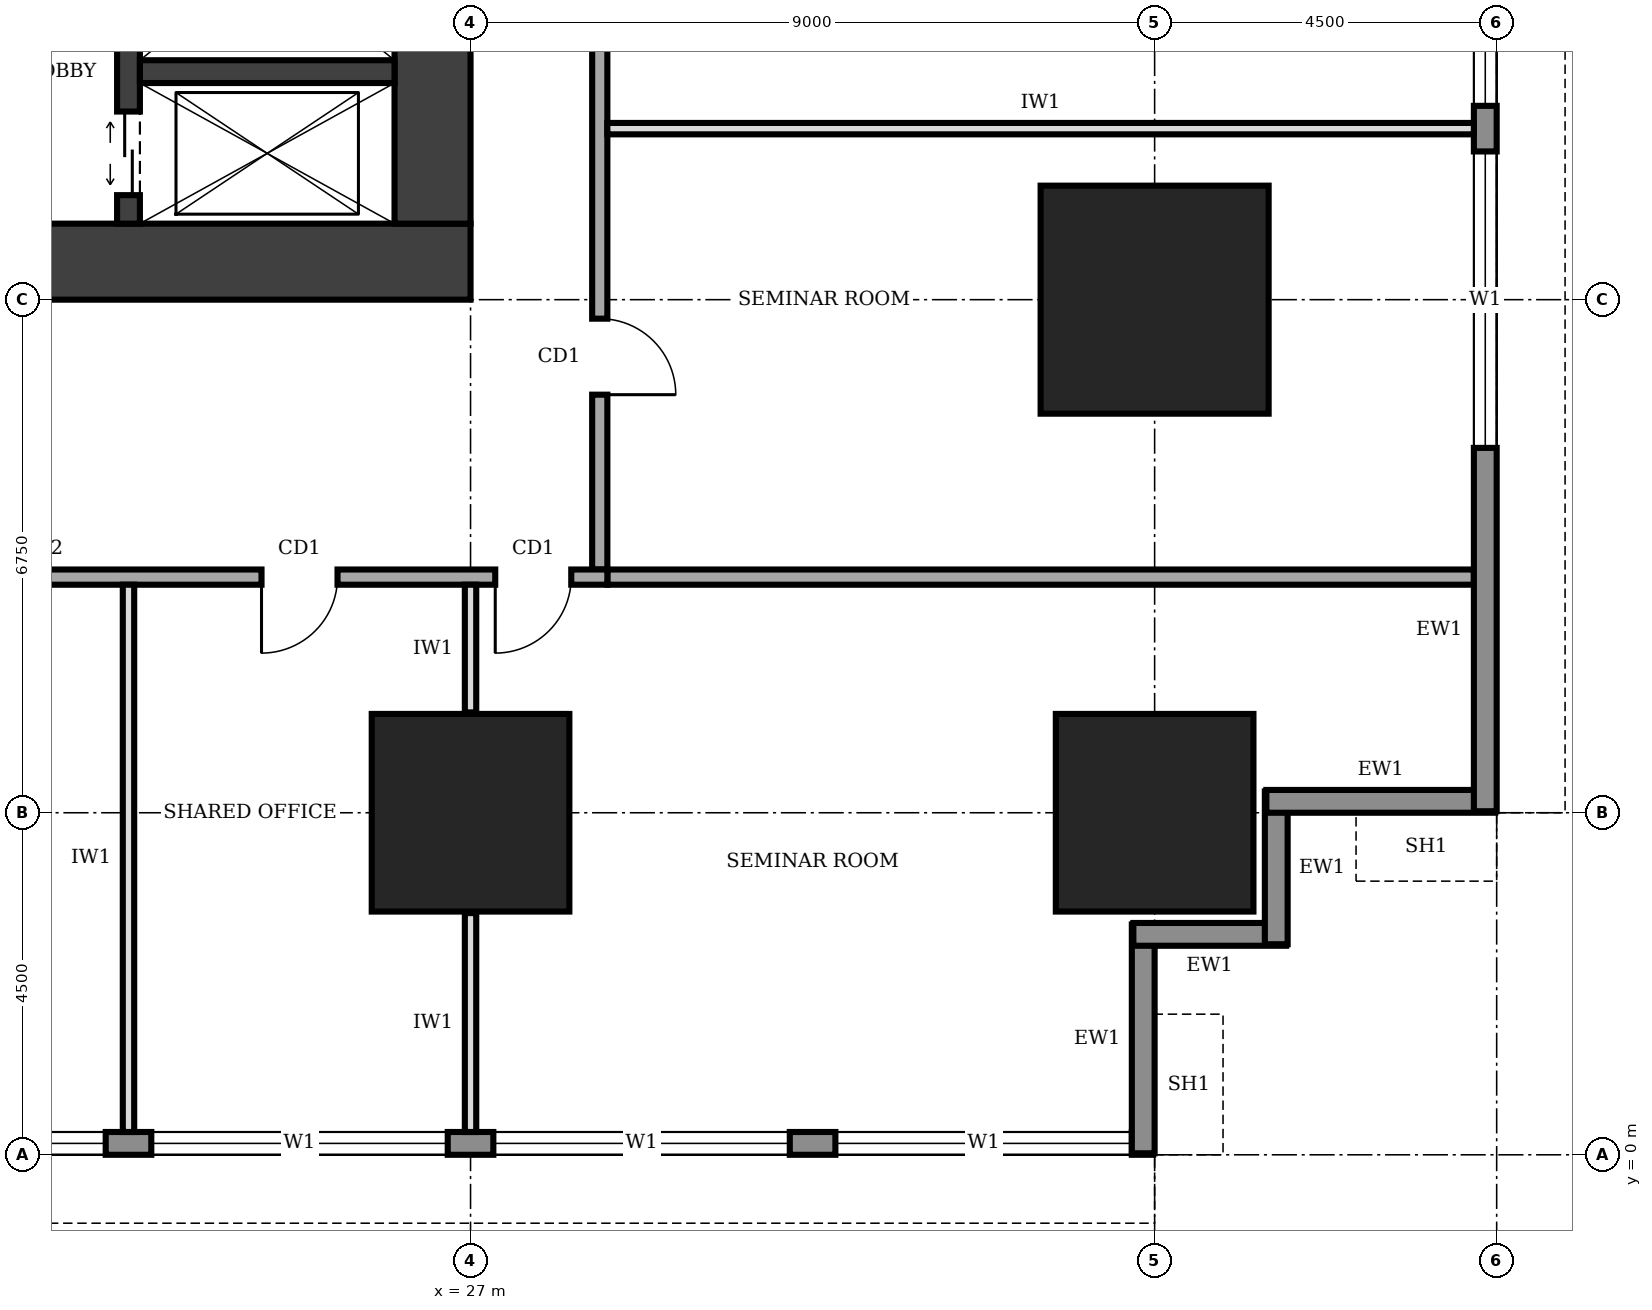
"""IFC4 building model, lengths in metres.
Left out: names, types, materials, properties, quantities, classifications, styles, units other than length and angle.
Written with IfcOpenShell. Run it as: python <this file> out.ifc"""

import sys

from ifc_helpers import new_model, si_unit, direction, frame, frame_2d, origin, origin_2d, place, context, subcontext, project, spatial, rectangle, extrude, element, fill, save


model = new_model("IFC4")
c1 = context("Model", 3, precision=1e-05, world=origin(), true_north=direction((0.0, 1.0)))
c2 = subcontext(c1, "Body", "Model", "MODEL_VIEW")
j1 = project(units=[si_unit("LENGTHUNIT", "METRE"), si_unit("PLANEANGLEUNIT", "RADIAN")], contexts=[c1])
p1 = place(None, origin())
s1 = spatial("IfcSite", under=j1, at=p1, CompositionType="ELEMENT")
p2 = place(p1, origin())
s2 = spatial("IfcBuilding", under=s1, at=p2, CompositionType="ELEMENT")
p3 = place(p2, frame((0.0, 0.0, 33.0)))
s3 = spatial("IfcBuildingStorey", under=s2, at=p3, CompositionType="ELEMENT", Elevation=33.0)
p4 = place(p3, frame((13.5, 11.75, 0.0), z_axis=(0.0, 0.0, 1.0), x_axis=(1.0, 0.0, 0.0)))
e1 = element("IfcWall", 1, at=p4, inside=s3, PredefinedType="SHEAR", context=c2, shape_type="SweptSolid", body=[
    extrude(rectangle(XDim=13.5, YDim=1.0, at=frame_2d((6.75, 0.0))), origin(), (0.0, 0.0, 1.0), 4.0),
])
p5 = place(p4, frame((4.75, 0.0, 0.0)))
e2 = element("IfcOpeningElement", 2, at=p5, cuts=e1, PredefinedType="OPENING", context=c2, shape_type="SweptSolid", body=[
    extrude(rectangle(XDim=1.0, YDim=2.1, at=frame_2d((0.5, 1.05))), frame((0.0, 0.51, 0.0), z_axis=(0.0, -1.0, 0.0), x_axis=(1.0, 0.0, 0.0)), (0.0, 0.0, 1.0), 1.02),
])
p6 = place(p3, frame((26.5, 12.25, 0.0), z_axis=(0.0, 0.0, 1.0), x_axis=(0.0, 1.0, 0.0)))
e3 = element("IfcWall", 3, at=p6, inside=s3, PredefinedType="SHEAR", context=c2, shape_type="SweptSolid", body=[
    extrude(rectangle(XDim=16.0, YDim=1.0, at=frame_2d((8.0, 0.0))), origin(), (0.0, 0.0, 1.0), 4.0),
])
p7 = place(p3, frame((22.5, 12.25, 0.0), z_axis=(0.0, 0.0, 1.0), x_axis=(0.0, 1.0, 0.0)))
e4 = element("IfcWall", 4, at=p7, inside=s3, PredefinedType="SHEAR", context=c2, shape_type="SweptSolid", body=[
    extrude(rectangle(XDim=16.0, YDim=0.3, at=frame_2d((8.0, 0.0))), origin(), (0.0, 0.0, 1.0), 4.0),
])
p8 = place(p7, frame((14.6, 0.0, 0.0)))
e5 = element("IfcOpeningElement", 5, at=p8, cuts=e4, PredefinedType="OPENING", context=c2, shape_type="SweptSolid", body=[
    extrude(rectangle(XDim=1.0, YDim=2.1, at=frame_2d((0.5, 1.05))), frame((0.0, 0.16, 0.0), z_axis=(0.0, -1.0, 0.0), x_axis=(1.0, 0.0, 0.0)), (0.0, 0.0, 1.0), 0.32),
])
p9 = place(p7, frame((0.375, 0.0, 0.0)))
e6 = element("IfcOpeningElement", 6, at=p9, cuts=e4, PredefinedType="OPENING", context=c2, shape_type="SweptSolid", body=[
    extrude(rectangle(XDim=1.1, YDim=2.1, at=frame_2d((0.55, 1.05))), frame((0.0, 0.16, 0.0), z_axis=(0.0, -1.0, 0.0), x_axis=(1.0, 0.0, 0.0)), (0.0, 0.0, 1.0), 0.32),
])
p10 = place(p7, frame((5.95, 0.0, 0.0)))
e7 = element("IfcOpeningElement", 7, at=p10, cuts=e4, PredefinedType="OPENING", context=c2, shape_type="SweptSolid", body=[
    extrude(rectangle(XDim=1.1, YDim=2.1, at=frame_2d((0.55, 1.05))), frame((0.0, 0.16, 0.0), z_axis=(0.0, -1.0, 0.0), x_axis=(1.0, 0.0, 0.0)), (0.0, 0.0, 1.0), 0.32),
])
p11 = place(p3, frame((22.65, 14.25, 0.0), z_axis=(0.0, 0.0, 1.0), x_axis=(1.0, 0.0, 0.0)))
e8 = element("IfcWall", 8, at=p11, inside=s3, PredefinedType="SHEAR", context=c2, shape_type="SweptSolid", body=[
    extrude(rectangle(XDim=3.35, YDim=0.3, at=frame_2d((1.675, 0.0))), origin(), (0.0, 0.0, 1.0), 4.0),
])
for number, where, z_axis, x_axis in (
    (9, (27.0, 4.5, 0.0), (0.0, 0.0, 1.0), (1.0, 0.0, 0.0)),
    (10, (36.0, 4.5, 0.0), (0.0, 0.0, 1.0), (1.0, 0.0, 0.0)),
):
    element("IfcColumn", number, at=place(p3, frame(where, z_axis=z_axis, x_axis=x_axis)), inside=s3, PredefinedType="COLUMN", context=c2, shape_type="SweptSolid", body=[
        extrude(rectangle(XDim=2.6, YDim=2.6, at=origin_2d()), origin(), (0.0, 0.0, 1.0), 4.0),
    ])
p12 = place(p3, frame((36.0, 11.25, 0.0), z_axis=(0.0, 0.0, 1.0), x_axis=(1.0, 0.0, 0.0)))
e11 = element("IfcColumn", 11, at=p12, inside=s3, PredefinedType="COLUMN", context=c2, shape_type="SweptSolid", body=[
    extrude(rectangle(XDim=3.0, YDim=3.0, at=origin_2d()), origin(), (0.0, 0.0, 1.0), 4.0),
])
p13 = place(p3, frame((4.52, 0.15, 0.0), z_axis=(0.0, 0.0, 1.0), x_axis=(1.0, 0.0, 0.0)))
e12 = element("IfcWall", 12, at=p13, inside=s3, PredefinedType="STANDARD", context=c2, shape_type="SweptSolid", body=[
    extrude(rectangle(XDim=31.46, YDim=0.3, at=frame_2d((15.73, 0.0))), origin(), (0.0, 0.0, 1.0), 3.75),
])
p14 = place(p13, frame((4.78, 0.0, 0.9)))
e13 = element("IfcOpeningElement", 13, at=p14, cuts=e12, PredefinedType="OPENING", context=c2, shape_type="SweptSolid", body=[
    extrude(rectangle(XDim=3.9, YDim=2.2, at=frame_2d((1.95, 1.1))), frame((0.0, 0.16, 0.0), z_axis=(0.0, -1.0, 0.0), x_axis=(1.0, 0.0, 0.0)), (0.0, 0.0, 1.0), 0.32),
])
p15 = place(p13, frame((9.28, 0.0, 0.9)))
e14 = element("IfcOpeningElement", 14, at=p15, cuts=e12, PredefinedType="OPENING", context=c2, shape_type="SweptSolid", body=[
    extrude(rectangle(XDim=3.9, YDim=2.2, at=frame_2d((1.95, 1.1))), frame((0.0, 0.16, 0.0), z_axis=(0.0, -1.0, 0.0), x_axis=(1.0, 0.0, 0.0)), (0.0, 0.0, 1.0), 0.32),
])
p16 = place(p13, frame((13.78, 0.0, 0.9)))
e15 = element("IfcOpeningElement", 15, at=p16, cuts=e12, PredefinedType="OPENING", context=c2, shape_type="SweptSolid", body=[
    extrude(rectangle(XDim=3.9, YDim=2.2, at=frame_2d((1.95, 1.1))), frame((0.0, 0.16, 0.0), z_axis=(0.0, -1.0, 0.0), x_axis=(1.0, 0.0, 0.0)), (0.0, 0.0, 1.0), 0.32),
])
p17 = place(p13, frame((18.28, 0.0, 0.9)))
e16 = element("IfcOpeningElement", 16, at=p17, cuts=e12, PredefinedType="OPENING", context=c2, shape_type="SweptSolid", body=[
    extrude(rectangle(XDim=3.9, YDim=2.2, at=frame_2d((1.95, 1.1))), frame((0.0, 0.16, 0.0), z_axis=(0.0, -1.0, 0.0), x_axis=(1.0, 0.0, 0.0)), (0.0, 0.0, 1.0), 0.32),
])
p18 = place(p13, frame((22.78, 0.0, 0.9)))
e17 = element("IfcOpeningElement", 17, at=p18, cuts=e12, PredefinedType="OPENING", context=c2, shape_type="SweptSolid", body=[
    extrude(rectangle(XDim=3.9, YDim=2.2, at=frame_2d((1.95, 1.1))), frame((0.0, 0.16, 0.0), z_axis=(0.0, -1.0, 0.0), x_axis=(1.0, 0.0, 0.0)), (0.0, 0.0, 1.0), 0.32),
])
p19 = place(p13, frame((27.28, 0.0, 0.9)))
e18 = element("IfcOpeningElement", 18, at=p19, cuts=e12, PredefinedType="OPENING", context=c2, shape_type="SweptSolid", body=[
    extrude(rectangle(XDim=3.9, YDim=2.2, at=frame_2d((1.95, 1.1))), frame((0.0, 0.16, 0.0), z_axis=(0.0, -1.0, 0.0), x_axis=(1.0, 0.0, 0.0)), (0.0, 0.0, 1.0), 0.32),
])
p20 = place(p3, frame((35.85, 0.02, 0.0), z_axis=(0.0, 0.0, 1.0), x_axis=(0.0, 1.0, 0.0)))
e19 = element("IfcWall", 19, at=p20, inside=s3, PredefinedType="STANDARD", context=c2, shape_type="SweptSolid", body=[
    extrude(rectangle(XDim=3.01, YDim=0.3, at=frame_2d((1.505, 0.0))), origin(), (0.0, 0.0, 1.0), 2.85),
])
for number, where, z_axis, x_axis in (
    (20, (35.72, 2.9, 0.0), (0.0, 0.0, 1.0), (1.0, 0.0, 0.0)),
    (21, (37.6, 2.77, 0.0), (0.0, 0.0, 1.0), (0.0, 1.0, 0.0)),
):
    element("IfcWall", number, at=place(p3, frame(where, z_axis=z_axis, x_axis=x_axis)), inside=s3, PredefinedType="STANDARD", context=c2, shape_type="SweptSolid", body=[
        extrude(rectangle(XDim=2.01, YDim=0.3, at=frame_2d((1.005, 0.0))), origin(), (0.0, 0.0, 1.0), 3.75),
    ])
p21 = place(p3, frame((37.47, 4.65, 0.0), z_axis=(0.0, 0.0, 1.0), x_axis=(1.0, 0.0, 0.0)))
e22 = element("IfcWall", 22, at=p21, inside=s3, PredefinedType="STANDARD", context=c2, shape_type="SweptSolid", body=[
    extrude(rectangle(XDim=3.01, YDim=0.3, at=frame_2d((1.505, 0.0))), origin(), (0.0, 0.0, 1.0), 2.85),
])
p22 = place(p3, frame((40.35, 4.52, 0.0), z_axis=(0.0, 0.0, 1.0), x_axis=(0.0, 1.0, 0.0)))
e23 = element("IfcWall", 23, at=p22, inside=s3, PredefinedType="STANDARD", context=c2, shape_type="SweptSolid", body=[
    extrude(rectangle(XDim=31.46, YDim=0.3, at=frame_2d((15.73, 0.0))), origin(), (0.0, 0.0, 1.0), 3.75),
])
p23 = place(p22, frame((4.78, 0.0, 0.9)))
e24 = element("IfcOpeningElement", 24, at=p23, cuts=e23, PredefinedType="OPENING", context=c2, shape_type="SweptSolid", body=[
    extrude(rectangle(XDim=3.9, YDim=2.2, at=frame_2d((1.95, 1.1))), frame((0.0, 0.16, 0.0), z_axis=(0.0, -1.0, 0.0), x_axis=(1.0, 0.0, 0.0)), (0.0, 0.0, 1.0), 0.32),
])
p24 = place(p22, frame((9.28, 0.0, 0.9)))
e25 = element("IfcOpeningElement", 25, at=p24, cuts=e23, PredefinedType="OPENING", context=c2, shape_type="SweptSolid", body=[
    extrude(rectangle(XDim=3.9, YDim=2.2, at=frame_2d((1.95, 1.1))), frame((0.0, 0.16, 0.0), z_axis=(0.0, -1.0, 0.0), x_axis=(1.0, 0.0, 0.0)), (0.0, 0.0, 1.0), 0.32),
])
p25 = place(p22, frame((13.78, 0.0, 0.9)))
e26 = element("IfcOpeningElement", 26, at=p25, cuts=e23, PredefinedType="OPENING", context=c2, shape_type="SweptSolid", body=[
    extrude(rectangle(XDim=3.9, YDim=2.2, at=frame_2d((1.95, 1.1))), frame((0.0, 0.16, 0.0), z_axis=(0.0, -1.0, 0.0), x_axis=(1.0, 0.0, 0.0)), (0.0, 0.0, 1.0), 0.32),
])
p26 = place(p22, frame((18.28, 0.0, 0.9)))
e27 = element("IfcOpeningElement", 27, at=p26, cuts=e23, PredefinedType="OPENING", context=c2, shape_type="SweptSolid", body=[
    extrude(rectangle(XDim=3.9, YDim=2.2, at=frame_2d((1.95, 1.1))), frame((0.0, 0.16, 0.0), z_axis=(0.0, -1.0, 0.0), x_axis=(1.0, 0.0, 0.0)), (0.0, 0.0, 1.0), 0.32),
])
p27 = place(p22, frame((22.78, 0.0, 0.9)))
e28 = element("IfcOpeningElement", 28, at=p27, cuts=e23, PredefinedType="OPENING", context=c2, shape_type="SweptSolid", body=[
    extrude(rectangle(XDim=3.9, YDim=2.2, at=frame_2d((1.95, 1.1))), frame((0.0, 0.16, 0.0), z_axis=(0.0, -1.0, 0.0), x_axis=(1.0, 0.0, 0.0)), (0.0, 0.0, 1.0), 0.32),
])
p28 = place(p22, frame((27.28, 0.0, 0.9)))
e29 = element("IfcOpeningElement", 29, at=p28, cuts=e23, PredefinedType="OPENING", context=c2, shape_type="SweptSolid", body=[
    extrude(rectangle(XDim=3.9, YDim=2.2, at=frame_2d((1.95, 1.1))), frame((0.0, 0.16, 0.0), z_axis=(0.0, -1.0, 0.0), x_axis=(1.0, 0.0, 0.0)), (0.0, 0.0, 1.0), 0.32),
])
p29 = place(p3, frame((11.9, 7.6, 0.0), z_axis=(0.0, 0.0, 1.0), x_axis=(1.0, 0.0, 0.0)))
e30 = element("IfcWall", 30, at=p29, inside=s3, PredefinedType="SOLIDWALL", context=c2, shape_type="SweptSolid", body=[
    extrude(rectangle(XDim=16.9, YDim=0.2, at=frame_2d((8.45, 0.0))), origin(), (0.0, 0.0, 1.0), 3.75),
])
p30 = place(p29, frame((0.275, 0.0, 0.0)))
e31 = element("IfcOpeningElement", 31, at=p30, cuts=e30, PredefinedType="OPENING", context=c2, shape_type="SweptSolid", body=[
    extrude(rectangle(XDim=1.0, YDim=2.1, at=frame_2d((0.5, 1.05))), frame((0.0, 0.11, 0.0), z_axis=(0.0, -1.0, 0.0), x_axis=(1.0, 0.0, 0.0)), (0.0, 0.0, 1.0), 0.22),
])
p31 = place(p29, frame((5.6, 0.0, 0.0)))
e32 = element("IfcOpeningElement", 32, at=p31, cuts=e30, PredefinedType="OPENING", context=c2, shape_type="SweptSolid", body=[
    extrude(rectangle(XDim=1.0, YDim=2.1, at=frame_2d((0.5, 1.05))), frame((0.0, 0.11, 0.0), z_axis=(0.0, -1.0, 0.0), x_axis=(1.0, 0.0, 0.0)), (0.0, 0.0, 1.0), 0.22),
])
p32 = place(p29, frame((12.35, 0.0, 0.0)))
e33 = element("IfcOpeningElement", 33, at=p32, cuts=e30, PredefinedType="OPENING", context=c2, shape_type="SweptSolid", body=[
    extrude(rectangle(XDim=1.0, YDim=2.1, at=frame_2d((0.5, 1.05))), frame((0.0, 0.11, 0.0), z_axis=(0.0, -1.0, 0.0), x_axis=(1.0, 0.0, 0.0)), (0.0, 0.0, 1.0), 0.22),
])
p33 = place(p29, frame((15.425, 0.0, 0.0)))
e34 = element("IfcOpeningElement", 34, at=p33, cuts=e30, PredefinedType="OPENING", context=c2, shape_type="SweptSolid", body=[
    extrude(rectangle(XDim=1.0, YDim=2.1, at=frame_2d((0.5, 1.05))), frame((0.0, 0.11, 0.0), z_axis=(0.0, -1.0, 0.0), x_axis=(1.0, 0.0, 0.0)), (0.0, 0.0, 1.0), 0.22),
])
p34 = place(p3, frame((28.7, 7.7, 0.0), z_axis=(0.0, 0.0, 1.0), x_axis=(0.0, 1.0, 0.0)))
e35 = element("IfcWall", 35, at=p34, inside=s3, PredefinedType="SOLIDWALL", context=c2, shape_type="SweptSolid", body=[
    extrude(rectangle(XDim=23.8, YDim=0.2, at=frame_2d((11.9, 0.0))), origin(), (0.0, 0.0, 1.0), 3.75),
])
p35 = place(p34, frame((2.3, 0.0, 0.0)))
e36 = element("IfcOpeningElement", 36, at=p35, cuts=e35, PredefinedType="OPENING", context=c2, shape_type="SweptSolid", body=[
    extrude(rectangle(XDim=1.0, YDim=2.1, at=frame_2d((0.5, 1.05))), frame((0.0, 0.11, 0.0), z_axis=(0.0, -1.0, 0.0), x_axis=(1.0, 0.0, 0.0)), (0.0, 0.0, 1.0), 0.22),
])
p36 = place(p34, frame((7.55, 0.0, 0.0)))
e37 = element("IfcOpeningElement", 37, at=p36, cuts=e35, PredefinedType="OPENING", context=c2, shape_type="SweptSolid", body=[
    extrude(rectangle(XDim=1.0, YDim=2.1, at=frame_2d((0.5, 1.05))), frame((0.0, 0.11, 0.0), z_axis=(0.0, -1.0, 0.0), x_axis=(1.0, 0.0, 0.0)), (0.0, 0.0, 1.0), 0.22),
])
p37 = place(p34, frame((12.05, 0.0, 0.0)))
e38 = element("IfcOpeningElement", 38, at=p37, cuts=e35, PredefinedType="OPENING", context=c2, shape_type="SweptSolid", body=[
    extrude(rectangle(XDim=1.0, YDim=2.1, at=frame_2d((0.5, 1.05))), frame((0.0, 0.11, 0.0), z_axis=(0.0, -1.0, 0.0), x_axis=(1.0, 0.0, 0.0)), (0.0, 0.0, 1.0), 0.22),
])
p38 = place(p34, frame((18.4, 0.0, 0.0)))
e39 = element("IfcOpeningElement", 39, at=p38, cuts=e35, PredefinedType="OPENING", context=c2, shape_type="SweptSolid", body=[
    extrude(rectangle(XDim=1.8, YDim=2.1, at=frame_2d((0.9, 1.05))), frame((0.0, 0.11, 0.0), z_axis=(0.0, -1.0, 0.0), x_axis=(1.0, 0.0, 0.0)), (0.0, 0.0, 1.0), 0.22),
])
p39 = place(p3, frame((28.8, 7.6, 0.0), z_axis=(0.0, 0.0, 1.0), x_axis=(1.0, 0.0, 0.0)))
e40 = element("IfcWall", 40, at=p39, inside=s3, PredefinedType="SOLIDWALL", context=c2, shape_type="SweptSolid", body=[
    extrude(rectangle(XDim=11.4, YDim=0.2, at=frame_2d((5.7, 0.0))), origin(), (0.0, 0.0, 1.0), 3.75),
])
p40 = place(p3, frame((22.5, 0.3, 0.0), z_axis=(0.0, 0.0, 1.0), x_axis=(0.0, 1.0, 0.0)))
e41 = element("IfcWall", 41, at=p40, inside=s3, PredefinedType="PARTITIONING", context=c2, shape_type="SweptSolid", body=[
    extrude(rectangle(XDim=7.2, YDim=0.15, at=frame_2d((3.6, 0.0))), origin(), (0.0, 0.0, 1.0), 3.75),
])
p41 = place(p3, frame((27.0, 0.3, 0.0), z_axis=(0.0, 0.0, 1.0), x_axis=(0.0, 1.0, 0.0)))
e42 = element("IfcWall", 42, at=p41, inside=s3, PredefinedType="PARTITIONING", context=c2, shape_type="SweptSolid", body=[
    extrude(rectangle(XDim=2.88, YDim=0.15, at=frame_2d((1.44, 0.0))), origin(), (0.0, 0.0, 1.0), 2.85),
])
p42 = place(p3, frame((27.0, 5.82, 0.0), z_axis=(0.0, 0.0, 1.0), x_axis=(0.0, 1.0, 0.0)))
e43 = element("IfcWall", 43, at=p42, inside=s3, PredefinedType="PARTITIONING", context=c2, shape_type="SweptSolid", body=[
    extrude(rectangle(XDim=1.68, YDim=0.15, at=frame_2d((0.84, 0.0))), origin(), (0.0, 0.0, 1.0), 2.85),
])
p43 = place(p3, frame((28.8, 13.5, 0.0), z_axis=(0.0, 0.0, 1.0), x_axis=(1.0, 0.0, 0.0)))
e44 = element("IfcWall", 44, at=p43, inside=s3, PredefinedType="PARTITIONING", context=c2, shape_type="SweptSolid", body=[
    extrude(rectangle(XDim=11.4, YDim=0.15, at=frame_2d((5.7, 0.0))), origin(), (0.0, 0.0, 1.0), 3.75),
])
p44 = place(p16, origin())
e45 = element("IfcWindow", 45, at=p44, inside=s3, PartitioningType="SINGLE_PANEL", PredefinedType="WINDOW", context=c2, shape_type="SweptSolid", body=[
    extrude(rectangle(XDim=3.9, YDim=2.2, at=frame_2d((1.95, 1.1))), frame((0.0, 0.03, 0.0), z_axis=(0.0, -1.0, 0.0), x_axis=(1.0, 0.0, 0.0)), (0.0, 0.0, 1.0), 0.06),
])
fill(e15, e45)
p45 = place(p17, origin())
e46 = element("IfcWindow", 46, at=p45, inside=s3, PartitioningType="SINGLE_PANEL", PredefinedType="WINDOW", context=c2, shape_type="SweptSolid", body=[
    extrude(rectangle(XDim=3.9, YDim=2.2, at=frame_2d((1.95, 1.1))), frame((0.0, 0.03, 0.0), z_axis=(0.0, -1.0, 0.0), x_axis=(1.0, 0.0, 0.0)), (0.0, 0.0, 1.0), 0.06),
])
fill(e16, e46)
p46 = place(p18, origin())
e47 = element("IfcWindow", 47, at=p46, inside=s3, PartitioningType="SINGLE_PANEL", PredefinedType="WINDOW", context=c2, shape_type="SweptSolid", body=[
    extrude(rectangle(XDim=3.9, YDim=2.2, at=frame_2d((1.95, 1.1))), frame((0.0, 0.03, 0.0), z_axis=(0.0, -1.0, 0.0), x_axis=(1.0, 0.0, 0.0)), (0.0, 0.0, 1.0), 0.06),
])
fill(e17, e47)
p47 = place(p19, origin())
e48 = element("IfcWindow", 48, at=p47, inside=s3, PartitioningType="SINGLE_PANEL", PredefinedType="WINDOW", context=c2, shape_type="SweptSolid", body=[
    extrude(rectangle(XDim=3.9, YDim=2.2, at=frame_2d((1.95, 1.1))), frame((0.0, 0.03, 0.0), z_axis=(0.0, -1.0, 0.0), x_axis=(1.0, 0.0, 0.0)), (0.0, 0.0, 1.0), 0.06),
])
fill(e18, e48)
p48 = place(p23, origin())
e49 = element("IfcWindow", 49, at=p48, inside=s3, PartitioningType="SINGLE_PANEL", PredefinedType="WINDOW", context=c2, shape_type="SweptSolid", body=[
    extrude(rectangle(XDim=3.9, YDim=2.2, at=frame_2d((1.95, 1.1))), frame((0.0, 0.03, 0.0), z_axis=(0.0, -1.0, 0.0), x_axis=(1.0, 0.0, 0.0)), (0.0, 0.0, 1.0), 0.06),
])
fill(e24, e49)
p49 = place(p24, origin())
e50 = element("IfcWindow", 50, at=p49, inside=s3, PartitioningType="SINGLE_PANEL", PredefinedType="WINDOW", context=c2, shape_type="SweptSolid", body=[
    extrude(rectangle(XDim=3.9, YDim=2.2, at=frame_2d((1.95, 1.1))), frame((0.0, 0.03, 0.0), z_axis=(0.0, -1.0, 0.0), x_axis=(1.0, 0.0, 0.0)), (0.0, 0.0, 1.0), 0.06),
])
fill(e25, e50)
p50 = place(p9, origin())
e51 = element("IfcDoor", 51, at=p50, inside=s3, OperationType="DOUBLE_DOOR_SLIDING", PredefinedType="DOOR", context=c2, shape_type="SweptSolid", body=[
    extrude(rectangle(XDim=1.1, YDim=2.1, at=frame_2d((0.55, 1.05))), frame((0.0, 0.025, 0.0), z_axis=(0.0, -1.0, 0.0), x_axis=(1.0, 0.0, 0.0)), (0.0, 0.0, 1.0), 0.05),
])
fill(e6, e51)
p51 = place(p32, frame((1.0, 0.0, 0.0), z_axis=(0.0, 0.0, 1.0), x_axis=(-1.0, 0.0, 0.0)))
e52 = element("IfcDoor", 52, at=p51, inside=s3, OperationType="SINGLE_SWING_RIGHT", PredefinedType="DOOR", context=c2, shape_type="SweptSolid", body=[
    extrude(rectangle(XDim=1.0, YDim=2.1, at=frame_2d((0.5, 1.05))), frame((0.0, 0.025, 0.0), z_axis=(0.0, -1.0, 0.0), x_axis=(1.0, 0.0, 0.0)), (0.0, 0.0, 1.0), 0.05),
])
fill(e33, e52)
p52 = place(p33, frame((1.0, 0.0, 0.0), z_axis=(0.0, 0.0, 1.0), x_axis=(-1.0, 0.0, 0.0)))
e53 = element("IfcDoor", 53, at=p52, inside=s3, OperationType="SINGLE_SWING_RIGHT", PredefinedType="DOOR", context=c2, shape_type="SweptSolid", body=[
    extrude(rectangle(XDim=1.0, YDim=2.1, at=frame_2d((0.5, 1.05))), frame((0.0, 0.025, 0.0), z_axis=(0.0, -1.0, 0.0), x_axis=(1.0, 0.0, 0.0)), (0.0, 0.0, 1.0), 0.05),
])
fill(e34, e53)
p53 = place(p35, frame((1.0, 0.0, 0.0), z_axis=(0.0, 0.0, 1.0), x_axis=(-1.0, 0.0, 0.0)))
e54 = element("IfcDoor", 54, at=p53, inside=s3, OperationType="SINGLE_SWING_RIGHT", PredefinedType="DOOR", context=c2, shape_type="SweptSolid", body=[
    extrude(rectangle(XDim=1.0, YDim=2.1, at=frame_2d((0.5, 1.05))), frame((0.0, 0.025, 0.0), z_axis=(0.0, -1.0, 0.0), x_axis=(1.0, 0.0, 0.0)), (0.0, 0.0, 1.0), 0.05),
])
fill(e36, e54)
save(model, sys.argv[1])
